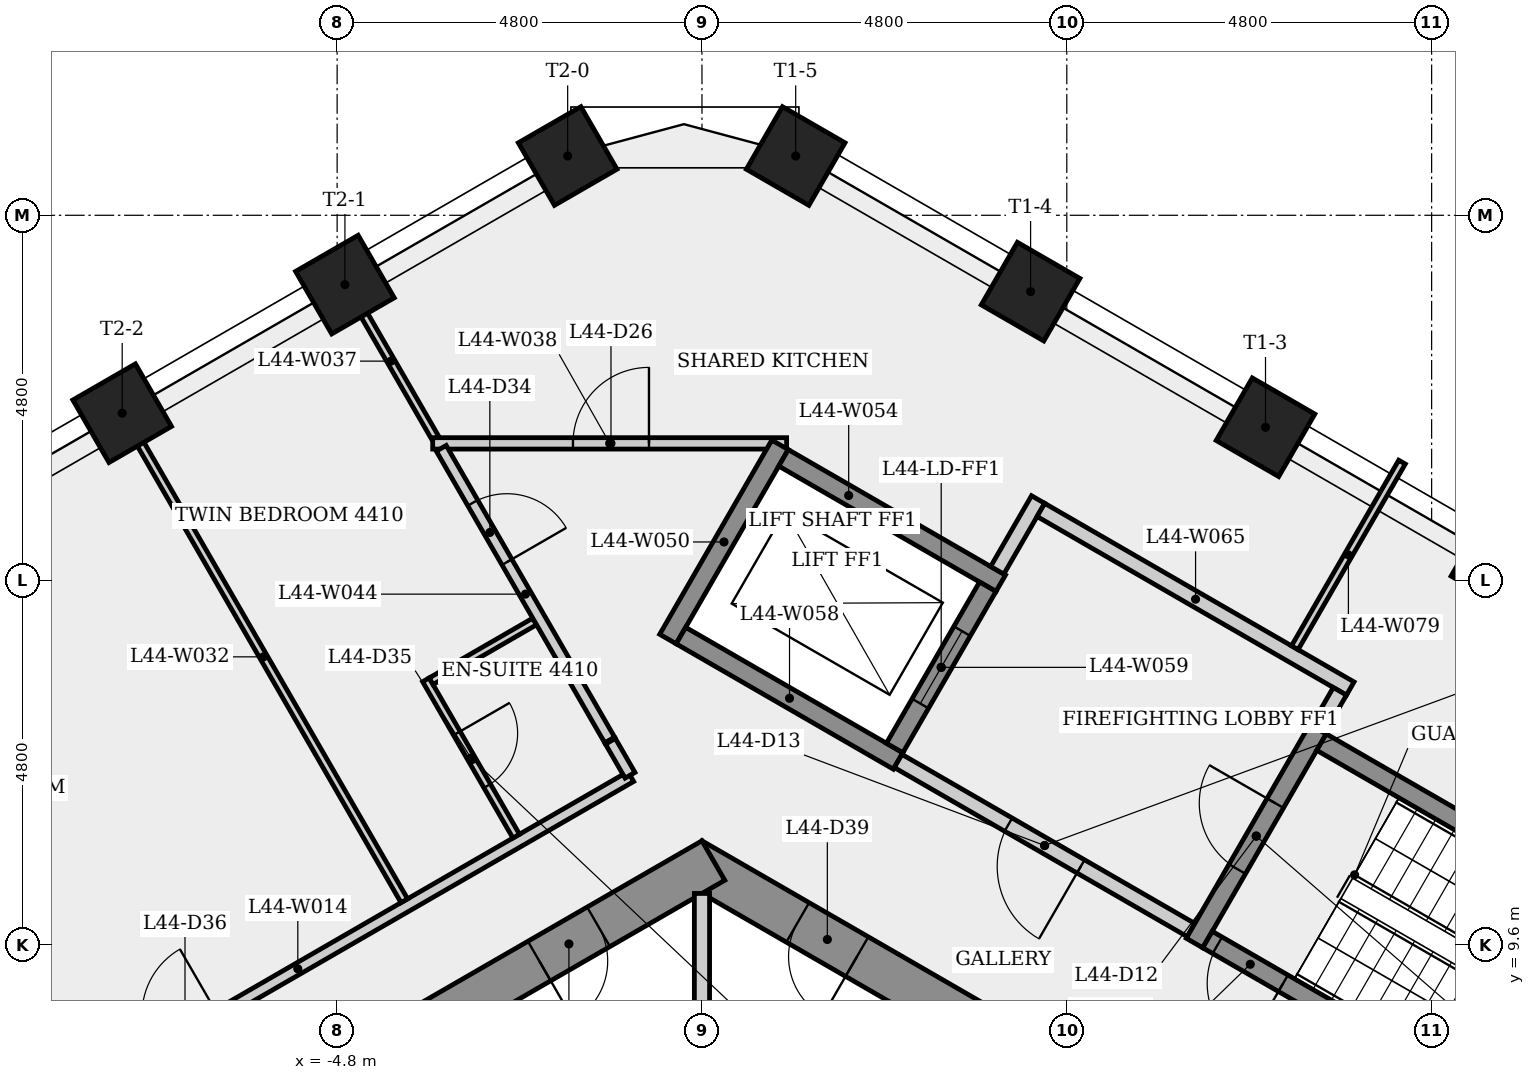
"""IFC4 building model, lengths in metres.
Left out: names, types, materials, properties, quantities, classifications, styles, units other than length and angle.
Written with IfcOpenShell. Run it as: python <this file> out.ifc"""

import sys

from ifc_helpers import new_model, si_unit, direction, frame, frame_2d, origin, origin_2d, place, context, subcontext, project, spatial, rectangle, extrude, element, fill, save


model = new_model("IFC4")
c1 = context("Model", 3, precision=1e-05, world=origin(), true_north=direction((0.0, 1.0)))
c2 = subcontext(c1, "Body", "Model", "MODEL_VIEW")
j1 = project(units=[si_unit("LENGTHUNIT", "METRE"), si_unit("PLANEANGLEUNIT", "RADIAN")], contexts=[c1])
p1 = place(None, origin())
s1 = spatial("IfcSite", under=j1, at=p1, CompositionType="ELEMENT")
p2 = place(p1, origin())
s2 = spatial("IfcBuilding", under=s1, at=p2, CompositionType="ELEMENT")
p3 = place(p2, frame((0.0, 0.0, 166.3)))
s3 = spatial("IfcBuildingStorey", under=s2, at=p3, CompositionType="ELEMENT", Elevation=166.3)
p4 = place(p3, frame((9.35, 5.225, 0.0), z_axis=(0.0, 0.0, 1.0), x_axis=(-0.866023993627, 0.500002442456, 0.0)))
e1 = element("IfcWall", 1, at=p4, inside=s3, PredefinedType="SHEAR", context=c2, shape_type="SweptSolid", body=[
    extrude(rectangle(XDim=10.97, YDim=0.6, at=frame_2d((5.485, 0.0))), origin(), (0.0, 0.0, 1.0), 3.4),
])
p5 = place(p4, frame((8.442, 0.0, 0.0)))
e2 = element("IfcOpeningElement", 2, at=p5, cuts=e1, PredefinedType="OPENING", context=c2, shape_type="SweptSolid", body=[
    extrude(rectangle(XDim=0.9, YDim=2.1, at=frame_2d((0.45, 1.05))), frame((0.0, 0.31, 0.0), z_axis=(0.0, -1.0, 0.0), x_axis=(1.0, 0.0, 0.0)), (0.0, 0.0, 1.0), 0.62),
])
p6 = place(p4, frame((1.634, 0.0, 0.0)))
e3 = element("IfcOpeningElement", 3, at=p6, cuts=e1, PredefinedType="OPENING", context=c2, shape_type="SweptSolid", body=[
    extrude(rectangle(XDim=0.9, YDim=2.1, at=frame_2d((0.45, 1.05))), frame((0.0, 0.31, 0.0), z_axis=(0.0, -1.0, 0.0), x_axis=(1.0, 0.0, 0.0)), (0.0, 0.0, 1.0), 0.62),
])
p7 = place(p3, frame((0.15, 10.71, 0.0), z_axis=(0.0, 0.0, 1.0), x_axis=(-0.866023993627, -0.500002442456, 0.0)))
e4 = element("IfcWall", 4, at=p7, inside=s3, PredefinedType="SHEAR", context=c2, shape_type="SweptSolid", body=[
    extrude(rectangle(XDim=10.97, YDim=0.6, at=frame_2d((5.485, 0.0))), origin(), (0.0, 0.0, 1.0), 3.4),
])
p8 = place(p7, frame((9.201, 0.0, 0.0)))
e5 = element("IfcOpeningElement", 5, at=p8, cuts=e4, PredefinedType="OPENING", context=c2, shape_type="SweptSolid", body=[
    extrude(rectangle(XDim=0.9, YDim=2.1, at=frame_2d((0.45, 1.05))), frame((0.0, 0.31, 0.0), z_axis=(0.0, -1.0, 0.0), x_axis=(1.0, 0.0, 0.0)), (0.0, 0.0, 1.0), 0.62),
])
p9 = place(p7, frame((1.744, 0.0, 0.0)))
e6 = element("IfcOpeningElement", 6, at=p9, cuts=e4, PredefinedType="OPENING", context=c2, shape_type="SweptSolid", body=[
    extrude(rectangle(XDim=0.9, YDim=2.1, at=frame_2d((0.45, 1.05))), frame((0.0, 0.31, 0.0), z_axis=(0.0, -1.0, 0.0), x_axis=(1.0, 0.0, 0.0)), (0.0, 0.0, 1.0), 0.62),
])
for number, where, z_axis, x_axis in (
    (7, (10.505, 14.626, 0.0), (0.0, 0.0, 1.0), (0.5, 0.866, 0.0)),
    (8, (7.414, 16.411, 0.0), (0.0, 0.0, 1.0), (0.5, 0.866, 0.0)),
    (9, (4.324, 18.195, 0.0), (0.0, 0.0, 1.0), (0.5, 0.866, 0.0)),
    (10, (1.233, 19.98, 0.0), (0.0, 0.0, 1.0), (0.5, 0.866, 0.0)),
    (11, (-1.767, 19.98, 0.0), (0.0, 0.0, 1.0), (-0.5, 0.866, 0.0)),
    (12, (-4.698, 18.288, 0.0), (0.0, 0.0, 1.0), (-0.5, 0.866, 0.0)),
    (13, (-7.628, 16.596, 0.0), (0.0, 0.0, 1.0), (-0.5, 0.866, 0.0)),
):
    element("IfcColumn", number, at=place(p3, frame(where, z_axis=z_axis, x_axis=x_axis)), inside=s3, PredefinedType="COLUMN", context=c2, shape_type="SweptSolid", body=[
        extrude(rectangle(XDim=0.95, YDim=0.95, at=origin_2d()), origin(), (0.0, 0.0, 1.0), 3.4),
    ])
p10 = place(p3, frame((-9.698, 6.756, 0.0), z_axis=(0.0, 0.0, 1.0), x_axis=(0.866026460776, 0.499998169232, 0.0)))
e14 = element("IfcWall", 14, at=p10, inside=s3, PredefinedType="PARTITIONING", context=c2, shape_type="SweptSolid", body=[
    extrude(rectangle(XDim=10.118, YDim=0.15, at=frame_2d((5.059, 0.0))), origin(), (0.0, 0.0, 1.0), 3.05),
])
p11 = place(p10, frame((2.845, 0.0, 0.0)))
e15 = element("IfcOpeningElement", 15, at=p11, cuts=e14, PredefinedType="OPENING", context=c2, shape_type="SweptSolid", body=[
    extrude(rectangle(XDim=1.0, YDim=2.1, at=frame_2d((0.5, 1.05))), frame((0.0, 0.085, 0.0), z_axis=(0.0, -1.0, 0.0), x_axis=(1.0, 0.0, 0.0)), (0.0, 0.0, 1.0), 0.17),
])
p12 = place(p3, frame((-3.916, 10.181, 0.0), z_axis=(0.0, 0.0, 1.0), x_axis=(-0.500011399757, 0.866018822032, 0.0)))
e16 = element("IfcWall", 16, at=p12, inside=s3, PredefinedType="PARTITIONING", context=c2, shape_type="SweptSolid", body=[
    extrude(rectangle(XDim=7.411, YDim=0.1, at=frame_2d((3.706, 0.0))), origin(), (0.0, 0.0, 1.0), 3.05),
])
p13 = place(p3, frame((-3.632, 13.088, 0.0), z_axis=(0.0, 0.0, 1.0), x_axis=(0.499986429846, -0.866033238375, 0.0)))
e17 = element("IfcWall", 17, at=p13, inside=s3, PredefinedType="PARTITIONING", context=c2, shape_type="SweptSolid", body=[
    extrude(rectangle(XDim=2.375, YDim=0.1, at=frame_2d((1.188, 0.0))), origin(), (0.0, 0.0, 1.0), 3.05),
])
p14 = place(p13, frame((0.812, 0.0, 0.0)))
e18 = element("IfcOpeningElement", 18, at=p14, cuts=e17, PredefinedType="OPENING", context=c2, shape_type="SweptSolid", body=[
    extrude(rectangle(XDim=0.8, YDim=2.1, at=frame_2d((0.4, 1.05))), frame((0.0, 0.06, 0.0), z_axis=(0.0, -1.0, 0.0), x_axis=(1.0, 0.0, 0.0)), (0.0, 0.0, 1.0), 0.12),
])
p15 = place(p3, frame((-3.505, 16.264, 0.0), z_axis=(0.0, 0.0, 1.0), x_axis=(-0.500040344412, 0.866002109674, 0.0)))
e19 = element("IfcWall", 19, at=p15, inside=s3, PredefinedType="PARTITIONING", context=c2, shape_type="SweptSolid", body=[
    extrude(rectangle(XDim=2.349, YDim=0.1, at=frame_2d((1.174, 0.0))), origin(), (0.0, 0.0, 1.0), 3.05),
])
p16 = place(p3, frame((-3.543, 16.199, 0.0), z_axis=(0.0, 0.0, 1.0), x_axis=(1.0, 0.0, 0.0)))
e20 = element("IfcWall", 20, at=p16, inside=s3, PredefinedType="PARTITIONING", context=c2, shape_type="SweptSolid", body=[
    extrude(rectangle(XDim=4.656, YDim=0.15, at=frame_2d((2.328, 0.0))), origin(), (0.0, 0.0, 1.0), 3.05),
])
p17 = place(p16, frame((1.845, 0.0, 0.0)))
e21 = element("IfcOpeningElement", 21, at=p17, cuts=e20, PredefinedType="OPENING", context=c2, shape_type="SweptSolid", body=[
    extrude(rectangle(XDim=1.0, YDim=2.1, at=frame_2d((0.5, 1.05))), frame((0.0, 0.085, 0.0), z_axis=(0.0, -1.0, 0.0), x_axis=(1.0, 0.0, 0.0)), (0.0, 0.0, 1.0), 0.17),
])
p18 = place(p3, frame((-2.201, 13.856, 0.0), z_axis=(0.0, 0.0, 1.0), x_axis=(-0.865989086347, -0.500062898373, 0.0)))
e22 = element("IfcWall", 22, at=p18, inside=s3, PredefinedType="PARTITIONING", context=c2, shape_type="SweptSolid", body=[
    extrude(rectangle(XDim=1.573, YDim=0.1, at=frame_2d((0.786, 0.0))), origin(), (0.0, 0.0, 1.0), 3.05),
])
p19 = place(p3, frame((-3.43, 16.134, 0.0), z_axis=(0.0, 0.0, 1.0), x_axis=(0.50000861454, -0.86602043012, 0.0)))
e23 = element("IfcWall", 23, at=p19, inside=s3, PredefinedType="PARTITIONING", context=c2, shape_type="SweptSolid", body=[
    extrude(rectangle(XDim=4.431, YDim=0.15, at=frame_2d((2.216, 0.0))), origin(), (0.0, 0.0, 1.0), 3.05),
])
p20 = place(p19, frame((0.829, 0.0, 0.0)))
e24 = element("IfcOpeningElement", 24, at=p20, cuts=e23, PredefinedType="OPENING", context=c2, shape_type="SweptSolid", body=[
    extrude(rectangle(XDim=0.9, YDim=2.1, at=frame_2d((0.45, 1.05))), frame((0.0, 0.085, 0.0), z_axis=(0.0, -1.0, 0.0), x_axis=(1.0, 0.0, 0.0)), (0.0, 0.0, 1.0), 0.17),
])
p21 = place(p3, frame((-1.205, 12.279, 0.0), z_axis=(0.0, 0.0, 1.0), x_axis=(0.499749740264, -0.866169843106, 0.0)))
e25 = element("IfcWall", 25, at=p21, inside=s3, PredefinedType="PARTITIONING", context=c2, shape_type="SweptSolid", body=[
    extrude(rectangle(XDim=0.516, YDim=0.15, at=frame_2d((0.258, 0.0))), origin(), (0.0, 0.0, 1.0), 3.05),
])
p22 = place(p3, frame((-0.448, 13.624, 0.0), z_axis=(0.0, 0.0, 1.0), x_axis=(0.500037662692, 0.866003658127, 0.0)))
e26 = element("IfcWall", 26, at=p22, inside=s3, PredefinedType="SHEAR", context=c2, shape_type="SweptSolid", body=[
    extrude(rectangle(XDim=2.95, YDim=0.25, at=frame_2d((1.475, 0.0))), origin(), (0.0, 0.0, 1.0), 3.05),
])
p23 = place(p3, frame((0.0, 10.277, 0.0), z_axis=(0.0, 0.0, 1.0), x_axis=(0.0, -1.0, 0.0)))
e27 = element("IfcWall", 27, at=p23, inside=s3, PredefinedType="PARTITIONING", context=c2, shape_type="SweptSolid", body=[
    extrude(rectangle(XDim=5.002, YDim=0.2, at=frame_2d((2.501, 0.0))), origin(), (0.0, 0.0, 1.0), 3.05),
])
for number, where, z_axis, x_axis in (
    (28, (1.073, 16.008, 0.0), (0.0, 0.0, 1.0), (0.866, -0.5, 0.0)),
    (29, (2.581, 12.02, 0.0), (0.0, 0.0, 1.0), (-0.866, 0.5, 0.0)),
):
    element("IfcWall", number, at=place(p3, frame(where, z_axis=z_axis, x_axis=x_axis)), inside=s3, PredefinedType="SHEAR", context=c2, shape_type="SweptSolid", body=[
        extrude(rectangle(XDim=3.3, YDim=0.25, at=frame_2d((1.65, 0.0))), origin(), (0.0, 0.0, 1.0), 3.05),
    ])
p24 = place(p3, frame((2.535, 12.191, 0.0), z_axis=(0.0, 0.0, 1.0), x_axis=(0.500061746146, 0.865989751695, 0.0)))
e30 = element("IfcWall", 30, at=p24, inside=s3, PredefinedType="SHEAR", context=c2, shape_type="SweptSolid", body=[
    extrude(rectangle(XDim=2.45, YDim=0.25, at=frame_2d((1.225, 0.0))), origin(), (0.0, 0.0, 1.0), 3.4),
])
p25 = place(p24, frame((0.675, 0.0, 0.0)))
e31 = element("IfcOpeningElement", 31, at=p25, cuts=e30, PredefinedType="OPENING", context=c2, shape_type="SweptSolid", body=[
    extrude(rectangle(XDim=1.1, YDim=2.1, at=frame_2d((0.55, 1.05))), frame((0.0, 0.135, 0.0), z_axis=(0.0, -1.0, 0.0), x_axis=(1.0, 0.0, 0.0)), (0.0, 0.0, 1.0), 0.27),
])
p26 = place(p3, frame((3.885, 14.529, 0.0), z_axis=(0.0, 0.0, 1.0), x_axis=(0.499997628298, 0.866026773083, 0.0)))
e32 = element("IfcWall", 32, at=p26, inside=s3, PredefinedType="PARTITIONING", context=c2, shape_type="SweptSolid", body=[
    extrude(rectangle(XDim=1.075, YDim=0.2, at=frame_2d((0.538, 0.0))), origin(), (0.0, 0.0, 1.0), 3.05),
])
p27 = place(p3, frame((4.459, 15.323, 0.0), z_axis=(0.0, 0.0, 1.0), x_axis=(0.866016039709, -0.500016218704, 0.0)))
e33 = element("IfcWall", 33, at=p27, inside=s3, PredefinedType="PARTITIONING", context=c2, shape_type="SweptSolid", body=[
    extrude(rectangle(XDim=4.7, YDim=0.2, at=frame_2d((2.35, 0.0))), origin(), (0.0, 0.0, 1.0), 3.05),
])
p28 = place(p3, frame((6.435, 9.795, 0.0), z_axis=(0.0, 0.0, 1.0), x_axis=(-0.866012907634, 0.500021643343, 0.0)))
e34 = element("IfcWall", 34, at=p28, inside=s3, PredefinedType="PARTITIONING", context=c2, shape_type="SweptSolid", body=[
    extrude(rectangle(XDim=4.45, YDim=0.2, at=frame_2d((2.225, 0.0))), origin(), (0.0, 0.0, 1.0), 3.05),
])
p29 = place(p28, frame((1.675, 0.0, 0.0)))
e35 = element("IfcOpeningElement", 35, at=p29, cuts=e34, PredefinedType="OPENING", context=c2, shape_type="SweptSolid", body=[
    extrude(rectangle(XDim=1.1, YDim=2.1, at=frame_2d((0.55, 1.05))), frame((0.0, 0.11, 0.0), z_axis=(0.0, -1.0, 0.0), x_axis=(1.0, 0.0, 0.0)), (0.0, 0.0, 1.0), 0.22),
])
p30 = place(p3, frame((6.48, 9.624, 0.0), z_axis=(0.0, 0.0, 1.0), x_axis=(0.500017246033, 0.866015446554, 0.0)))
e36 = element("IfcWall", 36, at=p30, inside=s3, PredefinedType="SHEAR", context=c2, shape_type="SweptSolid", body=[
    extrude(rectangle(XDim=3.25, YDim=0.25, at=frame_2d((1.625, 0.0))), origin(), (0.0, 0.0, 1.0), 3.05),
])
p31 = place(p30, frame((1.125, 0.0, 0.0)))
e37 = element("IfcOpeningElement", 37, at=p31, cuts=e36, PredefinedType="OPENING", context=c2, shape_type="SweptSolid", body=[
    extrude(rectangle(XDim=1.0, YDim=2.1, at=frame_2d((0.5, 1.05))), frame((0.0, 0.135, 0.0), z_axis=(0.0, -1.0, 0.0), x_axis=(1.0, 0.0, 0.0)), (0.0, 0.0, 1.0), 0.27),
])
p32 = place(p3, frame((7.8, 13.51, 0.0), z_axis=(0.0, 0.0, 1.0), x_axis=(0.500012199891, 0.86601836006, 0.0)))
e38 = element("IfcWall", 38, at=p32, inside=s3, PredefinedType="PARTITIONING", context=c2, shape_type="SweptSolid", body=[
    extrude(rectangle(XDim=2.82, YDim=0.1, at=frame_2d((1.41, 0.0))), origin(), (0.0, 0.0, 1.0), 3.05),
])
p33 = place(p3, frame((8.151, 12.268, 0.0), z_axis=(0.0, 0.0, 1.0), x_axis=(0.866025499775, -0.499999833739, 0.0)))
e39 = element("IfcWall", 39, at=p33, inside=s3, PredefinedType="SHEAR", context=c2, shape_type="SweptSolid", body=[
    extrude(rectangle(XDim=6.4, YDim=0.25, at=frame_2d((3.2, 0.0))), origin(), (0.0, 0.0, 1.0), 3.05),
])
p34 = place(p3, frame((8.393, 12.937, 0.0), z_axis=(0.0, 0.0, 1.0), x_axis=(-0.500065409566, -0.86598763626, 0.0)))
e40 = element("IfcWall", 40, at=p34, inside=s3, PredefinedType="PARTITIONING", context=c2, shape_type="SweptSolid", body=[
    extrude(rectangle(XDim=0.575, YDim=0.2, at=frame_2d((0.288, 0.0))), origin(), (0.0, 0.0, 1.0), 3.05),
])
p35 = place(p3, frame((12.194, 6.47, 0.0), z_axis=(0.0, 0.0, 1.0), x_axis=(-0.866025499775, 0.499999833739, 0.0)))
e41 = element("IfcWall", 41, at=p35, inside=s3, PredefinedType="SHEAR", context=c2, shape_type="SweptSolid", body=[
    extrude(rectangle(XDim=6.4, YDim=0.25, at=frame_2d((3.2, 0.0))), origin(), (0.0, 0.0, 1.0), 3.05),
])
p36 = place(p35, frame((5.25, 0.0, 0.0)))
e42 = element("IfcOpeningElement", 42, at=p36, cuts=e41, PredefinedType="OPENING", context=c2, shape_type="SweptSolid", body=[
    extrude(rectangle(XDim=1.0, YDim=2.1, at=frame_2d((0.5, 1.05))), frame((0.0, 0.135, 0.0), z_axis=(0.0, -1.0, 0.0), x_axis=(1.0, 0.0, 0.0)), (0.0, 0.0, 1.0), 0.27),
])
p37 = place(p36, origin())
e43 = element("IfcDoor", 43, at=p37, inside=s3, OperationType="SINGLE_SWING_LEFT", PredefinedType="DOOR", context=c2, shape_type="SweptSolid", body=[
    extrude(rectangle(XDim=1.0, YDim=2.1, at=frame_2d((0.5, 1.05))), frame((0.0, 0.025, 0.0), z_axis=(0.0, -1.0, 0.0), x_axis=(1.0, 0.0, 0.0)), (0.0, 0.0, 1.0), 0.05),
])
fill(e42, e43)
p38 = place(p31, origin())
e44 = element("IfcDoor", 44, at=p38, inside=s3, OperationType="SINGLE_SWING_RIGHT", PredefinedType="DOOR", context=c2, shape_type="SweptSolid", body=[
    extrude(rectangle(XDim=1.0, YDim=2.1, at=frame_2d((0.5, 1.05))), frame((0.0, 0.025, 0.0), z_axis=(0.0, -1.0, 0.0), x_axis=(1.0, 0.0, 0.0)), (0.0, 0.0, 1.0), 0.05),
])
fill(e37, e44)
p39 = place(p29, origin())
e45 = element("IfcDoor", 45, at=p39, inside=s3, OperationType="SINGLE_SWING_LEFT", PredefinedType="DOOR", context=c2, shape_type="SweptSolid", body=[
    extrude(rectangle(XDim=1.1, YDim=2.1, at=frame_2d((0.55, 1.05))), frame((0.0, 0.025, 0.0), z_axis=(0.0, -1.0, 0.0), x_axis=(1.0, 0.0, 0.0)), (0.0, 0.0, 1.0), 0.05),
])
fill(e35, e45)
p40 = place(p25, origin())
e46 = element("IfcDoor", 46, at=p40, inside=s3, OperationType="SLIDING_TO_LEFT", PredefinedType="DOOR", context=c2, shape_type="SweptSolid", body=[
    extrude(rectangle(XDim=1.1, YDim=2.1, at=frame_2d((0.55, 1.05))), frame((0.0, 0.025, 0.0), z_axis=(0.0, -1.0, 0.0), x_axis=(1.0, 0.0, 0.0)), (0.0, 0.0, 1.0), 0.05),
])
fill(e31, e46)
p41 = place(p17, origin())
e47 = element("IfcDoor", 47, at=p41, inside=s3, OperationType="SINGLE_SWING_RIGHT", PredefinedType="DOOR", context=c2, shape_type="SweptSolid", body=[
    extrude(rectangle(XDim=1.0, YDim=2.1, at=frame_2d((0.5, 1.05))), frame((0.0, 0.025, 0.0), z_axis=(0.0, -1.0, 0.0), x_axis=(1.0, 0.0, 0.0)), (0.0, 0.0, 1.0), 0.05),
])
fill(e21, e47)
p42 = place(p20, origin())
e48 = element("IfcDoor", 48, at=p42, inside=s3, OperationType="SINGLE_SWING_RIGHT", PredefinedType="DOOR", context=c2, shape_type="SweptSolid", body=[
    extrude(rectangle(XDim=0.9, YDim=2.1, at=frame_2d((0.45, 1.05))), frame((0.0, 0.025, 0.0), z_axis=(0.0, -1.0, 0.0), x_axis=(1.0, 0.0, 0.0)), (0.0, 0.0, 1.0), 0.05),
])
fill(e24, e48)
p43 = place(p14, origin())
e49 = element("IfcDoor", 49, at=p43, inside=s3, OperationType="SINGLE_SWING_LEFT", PredefinedType="DOOR", context=c2, shape_type="SweptSolid", body=[
    extrude(rectangle(XDim=0.8, YDim=2.1, at=frame_2d((0.4, 1.05))), frame((0.0, 0.025, 0.0), z_axis=(0.0, -1.0, 0.0), x_axis=(1.0, 0.0, 0.0)), (0.0, 0.0, 1.0), 0.05),
])
fill(e18, e49)
p44 = place(p9, origin())
e50 = element("IfcDoor", 50, at=p44, inside=s3, OperationType="SINGLE_SWING_RIGHT", PredefinedType="DOOR", context=c2, shape_type="SweptSolid", body=[
    extrude(rectangle(XDim=0.9, YDim=2.1, at=frame_2d((0.45, 1.05))), frame((0.0, 0.025, 0.0), z_axis=(0.0, -1.0, 0.0), x_axis=(1.0, 0.0, 0.0)), (0.0, 0.0, 1.0), 0.05),
])
fill(e6, e50)
p45 = place(p5, origin())
e51 = element("IfcDoor", 51, at=p45, inside=s3, OperationType="SINGLE_SWING_LEFT", PredefinedType="DOOR", context=c2, shape_type="SweptSolid", body=[
    extrude(rectangle(XDim=0.9, YDim=2.1, at=frame_2d((0.45, 1.05))), frame((0.0, 0.025, 0.0), z_axis=(0.0, -1.0, 0.0), x_axis=(1.0, 0.0, 0.0)), (0.0, 0.0, 1.0), 0.05),
])
fill(e2, e51)
save(model, sys.argv[1])
